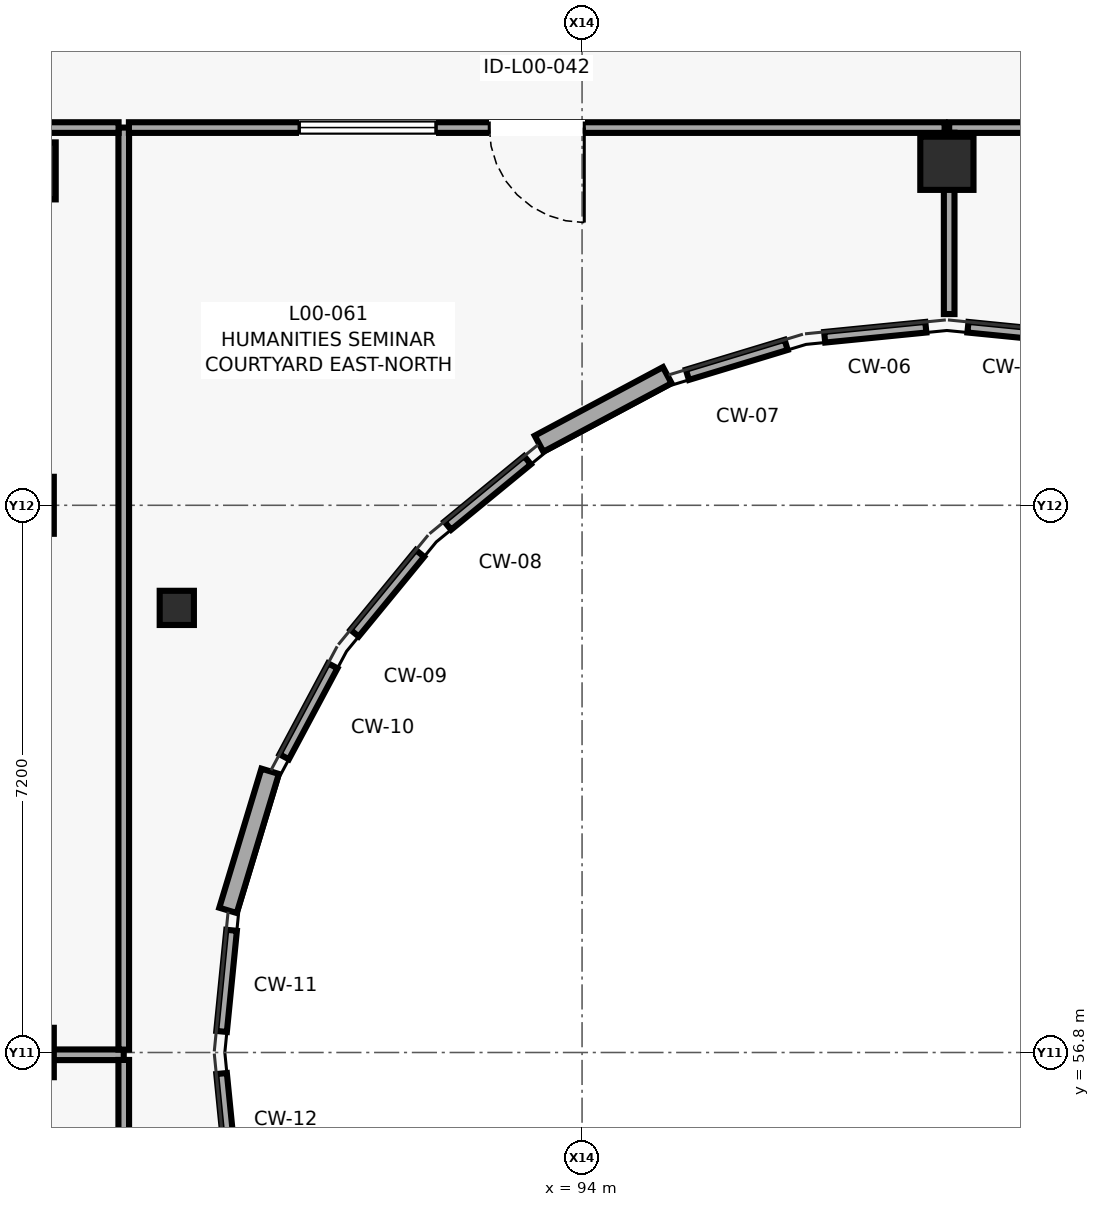
"""IFC4 building model, lengths in metres.
Left out: names, types, materials, properties, quantities, classifications, styles, units other than length and angle.
Written with IfcOpenShell. Run it as: python <this file> out.ifc"""

import sys

from ifc_helpers import new_model, si_unit, direction, frame, frame_2d, origin, origin_2d, place, context, subcontext, project, spatial, rectangle, circle, extrude, element, fill, save


model = new_model("IFC4")
c1 = context("Model", 3, precision=1e-05, world=origin(), true_north=direction((0.0, 1.0)))
c2 = subcontext(c1, "Body", "Model", "MODEL_VIEW")
j1 = project(units=[si_unit("LENGTHUNIT", "METRE"), si_unit("PLANEANGLEUNIT", "RADIAN")], contexts=[c1])
p1 = place(None, origin())
s1 = spatial("IfcSite", under=j1, at=p1, CompositionType="ELEMENT")
p2 = place(p1, origin())
s2 = spatial("IfcBuilding", under=s1, at=p2, CompositionType="ELEMENT")
p3 = place(p2, origin())
s3 = spatial("IfcBuildingStorey", under=s2, at=p3, CompositionType="ELEMENT", Elevation=0.0)
p4 = place(p3, frame((86.8, 56.8, 0.0), z_axis=(0.0, 0.0, 1.0), x_axis=(1.0, 0.0, 0.0)))
e1 = element("IfcColumn", 1, at=p4, inside=s3, PredefinedType="COLUMN", context=c2, shape_type="SweptSolid", body=[
    extrude(rectangle(XDim=0.5, YDim=0.65, at=origin_2d()), origin(), (0.0, 0.0, 1.0), 4.2),
])
p5 = place(p3, frame((86.8, 64.0, 0.0), z_axis=(0.0, 0.0, 1.0), x_axis=(1.0, 0.0, 0.0)))
e2 = element("IfcColumn", 2, at=p5, inside=s3, PredefinedType="COLUMN", context=c2, shape_type="SweptSolid", body=[
    extrude(rectangle(XDim=0.5, YDim=0.75, at=origin_2d()), origin(), (0.0, 0.0, 1.0), 4.2),
])
p6 = place(p3, frame((86.8, 68.4, 0.0), z_axis=(0.0, 0.0, 1.0), x_axis=(1.0, 0.0, 0.0)))
e3 = element("IfcColumn", 3, at=p6, inside=s3, PredefinedType="COLUMN", context=c2, shape_type="SweptSolid", body=[
    extrude(rectangle(XDim=0.55, YDim=0.75, at=origin_2d()), origin(), (0.0, 0.0, 1.0), 4.2),
])
p7 = place(p3, frame((88.668, 62.65, 0.0), z_axis=(0.0, 0.0, 1.0), x_axis=(1.0, 0.0, 0.0)))
e4 = element("IfcColumn", 4, at=p7, inside=s3, PredefinedType="COLUMN", context=c2, shape_type="SweptSolid", body=[
    extrude(circle(Radius=0.225, at=origin_2d()), origin(), (0.0, 0.0, 1.0), 4.2),
])
p8 = place(p3, frame((98.8, 68.5, 0.0), z_axis=(0.0, 0.0, 1.0), x_axis=(1.0, 0.0, 0.0)))
e5 = element("IfcColumn", 5, at=p8, inside=s3, PredefinedType="COLUMN", context=c2, shape_type="SweptSolid", body=[
    extrude(circle(Radius=0.35, at=origin_2d()), origin(), (0.0, 0.0, 1.0), 4.2),
])
p9 = place(p3, frame((95.121, 65.712, 0.0), z_axis=(0.0, 0.0, 1.0), x_axis=(-0.881893245259, -0.471449153109, 0.0)))
e6 = element("IfcWall", 6, at=p9, inside=s3, PredefinedType="SOLIDWALL", context=c2, shape_type="SweptSolid", body=[
    extrude(rectangle(XDim=1.913, YDim=0.24, at=frame_2d((0.957, 0.0))), origin(), (0.0, 0.0, 1.0), 3.98),
])
p10 = place(p3, frame((89.896, 60.5, 0.0), z_axis=(0.0, 0.0, 1.0), x_axis=(-0.289713248393, -0.957113490504, 0.0)))
e7 = element("IfcWall", 7, at=p10, inside=s3, PredefinedType="SOLIDWALL", context=c2, shape_type="SweptSolid", body=[
    extrude(rectangle(XDim=1.912, YDim=0.24, at=frame_2d((0.956, 0.0))), origin(), (0.0, 0.0, 1.0), 3.98),
])
p11 = place(p3, frame((87.97, 56.77, 0.0), z_axis=(0.0, 0.0, 1.0), x_axis=(-1.0, 0.0, 0.0)))
e8 = element("IfcWall", 8, at=p11, inside=s3, PredefinedType="PARTITIONING", context=c2, shape_type="SweptSolid", body=[
    extrude(rectangle(XDim=8.44, YDim=0.14, at=frame_2d((4.22, 0.0))), origin(), (0.0, 0.0, 1.0), 3.225),
])
p12 = place(p3, frame((87.97, 44.698, 0.0), z_axis=(0.0, 0.0, 1.0), x_axis=(0.0, 1.0, 0.0)))
e9 = element("IfcWall", 9, at=p12, inside=s3, PredefinedType="PARTITIONING", context=c2, shape_type="SweptSolid", body=[
    extrude(rectangle(XDim=12.004, YDim=0.14, at=frame_2d((6.002, 0.0))), origin(), (0.0, 0.0, 1.0), 3.975),
])
p13 = place(p3, frame((87.97, 56.838, 0.0), z_axis=(0.0, 0.0, 1.0), x_axis=(0.0, 1.0, 0.0)))
e10 = element("IfcWall", 10, at=p13, inside=s3, PredefinedType="PARTITIONING", context=c2, shape_type="SweptSolid", body=[
    extrude(rectangle(XDim=12.132, YDim=0.14, at=frame_2d((6.066, 0.0))), origin(), (0.0, 0.0, 1.0), 3.975),
])
p14 = place(p3, frame((87.902, 68.97, 0.0), z_axis=(0.0, 0.0, 1.0), x_axis=(-1.0, 0.0, 0.0)))
e11 = element("IfcWall", 11, at=p14, inside=s3, PredefinedType="PARTITIONING", context=c2, shape_type="SweptSolid", body=[
    extrude(rectangle(XDim=8.372, YDim=0.14, at=frame_2d((4.186, 0.0))), origin(), (0.0, 0.0, 1.0), 3.975),
])
p15 = place(p3, frame((112.97, 68.97, 0.0), z_axis=(0.0, 0.0, 1.0), x_axis=(-1.0, 0.0, 0.0)))
e12 = element("IfcWall", 12, at=p15, inside=s3, PredefinedType="PARTITIONING", context=c2, shape_type="SweptSolid", body=[
    extrude(rectangle(XDim=14.14, YDim=0.14, at=frame_2d((7.07, 0.0))), origin(), (0.0, 0.0, 1.0), 3.975),
])
p16 = place(p15, frame((6.52, 0.0, 0.0)))
e13 = element("IfcOpeningElement", 13, at=p16, cuts=e12, PredefinedType="OPENING", context=c2, shape_type="SweptSolid", body=[
    extrude(rectangle(XDim=1.1, YDim=2.1, at=frame_2d((0.55, 1.05))), frame((0.0, 0.08, 0.0), z_axis=(0.0, -1.0, 0.0), x_axis=(1.0, 0.0, 0.0)), (0.0, 0.0, 1.0), 0.16),
])
p17 = place(p15, frame((8.32, 0.0, 1.05)))
e14 = element("IfcOpeningElement", 14, at=p17, cuts=e12, PredefinedType="OPENING", context=c2, shape_type="SweptSolid", body=[
    extrude(rectangle(XDim=1.4, YDim=1.05, at=frame_2d((0.7, 0.525))), frame((0.0, 0.08, 0.0), z_axis=(0.0, -1.0, 0.0), x_axis=(1.0, 0.0, 0.0)), (0.0, 0.0, 1.0), 0.16),
])
p18 = place(p3, frame((98.83, 68.902, 0.0), z_axis=(0.0, 0.0, 1.0), x_axis=(0.0, -1.0, 0.0)))
e15 = element("IfcWall", 15, at=p18, inside=s3, PredefinedType="PARTITIONING", context=c2, shape_type="SweptSolid", body=[
    extrude(rectangle(XDim=2.386, YDim=0.14, at=frame_2d((1.193, 0.0))), origin(), (0.0, 0.0, 1.0), 3.975),
])
for number, where, z_axis, x_axis in (
    (16, (99.077, 66.343, 0.0), (0.0, 0.0, 1.0), (0.995, -0.099, 0.0)),
    (17, (89.389, 55.192, 0.0), (0.0, 0.0, 1.0), (-0.099, 0.995, 0.0)),
):
    element("IfcWall", number, at=place(p3, frame(where, z_axis=z_axis, x_axis=x_axis)), inside=s3, PredefinedType="PARTITIONING", context=c2, shape_type="SweptSolid", body=[
        extrude(rectangle(XDim=1.338, YDim=0.14, at=frame_2d((0.669, 0.0))), origin(), (0.0, 0.0, 1.0), 3.975),
    ])
p19 = place(p3, frame((92.233, 63.732, 0.0), z_axis=(0.0, 0.0, 1.0), x_axis=(0.772962530207, 0.634451674201, 0.0)))
e18 = element("IfcWall", 18, at=p19, inside=s3, PredefinedType="PARTITIONING", context=c2, shape_type="SweptSolid", body=[
    extrude(rectangle(XDim=1.357, YDim=0.14, at=frame_2d((0.679, 0.0))), origin(), (0.0, 0.0, 1.0), 3.975),
])
p20 = place(p3, frame((95.386, 65.717, 0.0), z_axis=(0.0, 0.0, 1.0), x_axis=(0.956945716193, 0.290266939661, 0.0)))
e19 = element("IfcWall", 19, at=p20, inside=s3, PredefinedType="PARTITIONING", context=c2, shape_type="SweptSolid", body=[
    extrude(rectangle(XDim=1.357, YDim=0.14, at=frame_2d((0.679, 0.0))), origin(), (0.0, 0.0, 1.0), 3.975),
])
p21 = place(p3, frame((97.192, 66.211, 0.0), z_axis=(0.0, 0.0, 1.0), x_axis=(0.995112801185, 0.098744685517, 0.0)))
e20 = element("IfcWall", 20, at=p21, inside=s3, PredefinedType="PARTITIONING", context=c2, shape_type="SweptSolid", body=[
    extrude(rectangle(XDim=1.338, YDim=0.14, at=frame_2d((0.669, 0.0))), origin(), (0.0, 0.0, 1.0), 3.975),
])
p22 = place(p3, frame((98.77, 68.97, 0.0), z_axis=(0.0, 0.0, 1.0), x_axis=(-1.0, 0.0, 0.0)))
e21 = element("IfcWall", 21, at=p22, inside=s3, PredefinedType="PARTITIONING", context=c2, shape_type="SweptSolid", body=[
    extrude(rectangle(XDim=10.732, YDim=0.14, at=frame_2d((5.366, 0.0))), origin(), (0.0, 0.0, 1.0), 3.975),
])
p23 = place(p22, frame((4.741, 0.0, 0.0)))
e22 = element("IfcOpeningElement", 22, at=p23, cuts=e21, PredefinedType="OPENING", context=c2, shape_type="SweptSolid", body=[
    extrude(rectangle(XDim=1.25, YDim=2.22, at=frame_2d((0.625, 1.11))), frame((0.0, 0.08, 0.0), z_axis=(0.0, -1.0, 0.0), x_axis=(1.0, 0.0, 0.0)), (0.0, 0.0, 1.0), 0.16),
])
p24 = place(p22, frame((6.691, 0.0, 1.05)))
e23 = element("IfcOpeningElement", 23, at=p24, cuts=e21, PredefinedType="OPENING", context=c2, shape_type="SweptSolid", body=[
    extrude(rectangle(XDim=1.8, YDim=1.2, at=frame_2d((0.9, 0.6))), frame((0.0, 0.08, 0.0), z_axis=(0.0, -1.0, 0.0), x_axis=(1.0, 0.0, 0.0)), (0.0, 0.0, 1.0), 0.16),
])
p25 = place(p3, frame((89.257, 57.077, 0.0), z_axis=(0.0, 0.0, 1.0), x_axis=(0.098563937798, 0.99513072014, 0.0)))
e24 = element("IfcWall", 24, at=p25, inside=s3, PredefinedType="PARTITIONING", context=c2, shape_type="SweptSolid", body=[
    extrude(rectangle(XDim=1.338, YDim=0.14, at=frame_2d((0.669, 0.0))), origin(), (0.0, 0.0, 1.0), 3.975),
])
for number, where, z_axis, x_axis in (
    (25, (90.081, 60.691, 0.0), (0.0, 0.0, 1.0), (0.471, 0.882, 0.0)),
    (26, (91.007, 62.318, 0.0), (0.0, 0.0, 1.0), (0.634, 0.773, 0.0)),
):
    element("IfcWall", number, at=place(p3, frame(where, z_axis=z_axis, x_axis=x_axis)), inside=s3, PredefinedType="PARTITIONING", context=c2, shape_type="SweptSolid", body=[
        extrude(rectangle(XDim=1.357, YDim=0.14, at=frame_2d((0.678, 0.0))), origin(), (0.0, 0.0, 1.0), 3.975),
    ])
p26 = place(p23, origin())
e27 = element("IfcDoor", 27, at=p26, inside=s3, OperationType="SINGLE_SWING_LEFT", PredefinedType="DOOR", context=c2, shape_type="SweptSolid", body=[
    extrude(rectangle(XDim=1.25, YDim=2.22, at=frame_2d((0.625, 1.11))), frame((0.0, 0.025, 0.0), z_axis=(0.0, -1.0, 0.0), x_axis=(1.0, 0.0, 0.0)), (0.0, 0.0, 1.0), 0.05),
])
fill(e22, e27)
p27 = place(p24, origin())
e28 = element("IfcWindow", 28, at=p27, inside=s3, PartitioningType="SINGLE_PANEL", PredefinedType="WINDOW", context=c2, shape_type="SweptSolid", body=[
    extrude(rectangle(XDim=1.8, YDim=1.2, at=frame_2d((0.9, 0.6))), frame((0.0, 0.03, 0.0), z_axis=(0.0, -1.0, 0.0), x_axis=(1.0, 0.0, 0.0)), (0.0, 0.0, 1.0), 0.06),
])
fill(e23, e28)
save(model, sys.argv[1])
